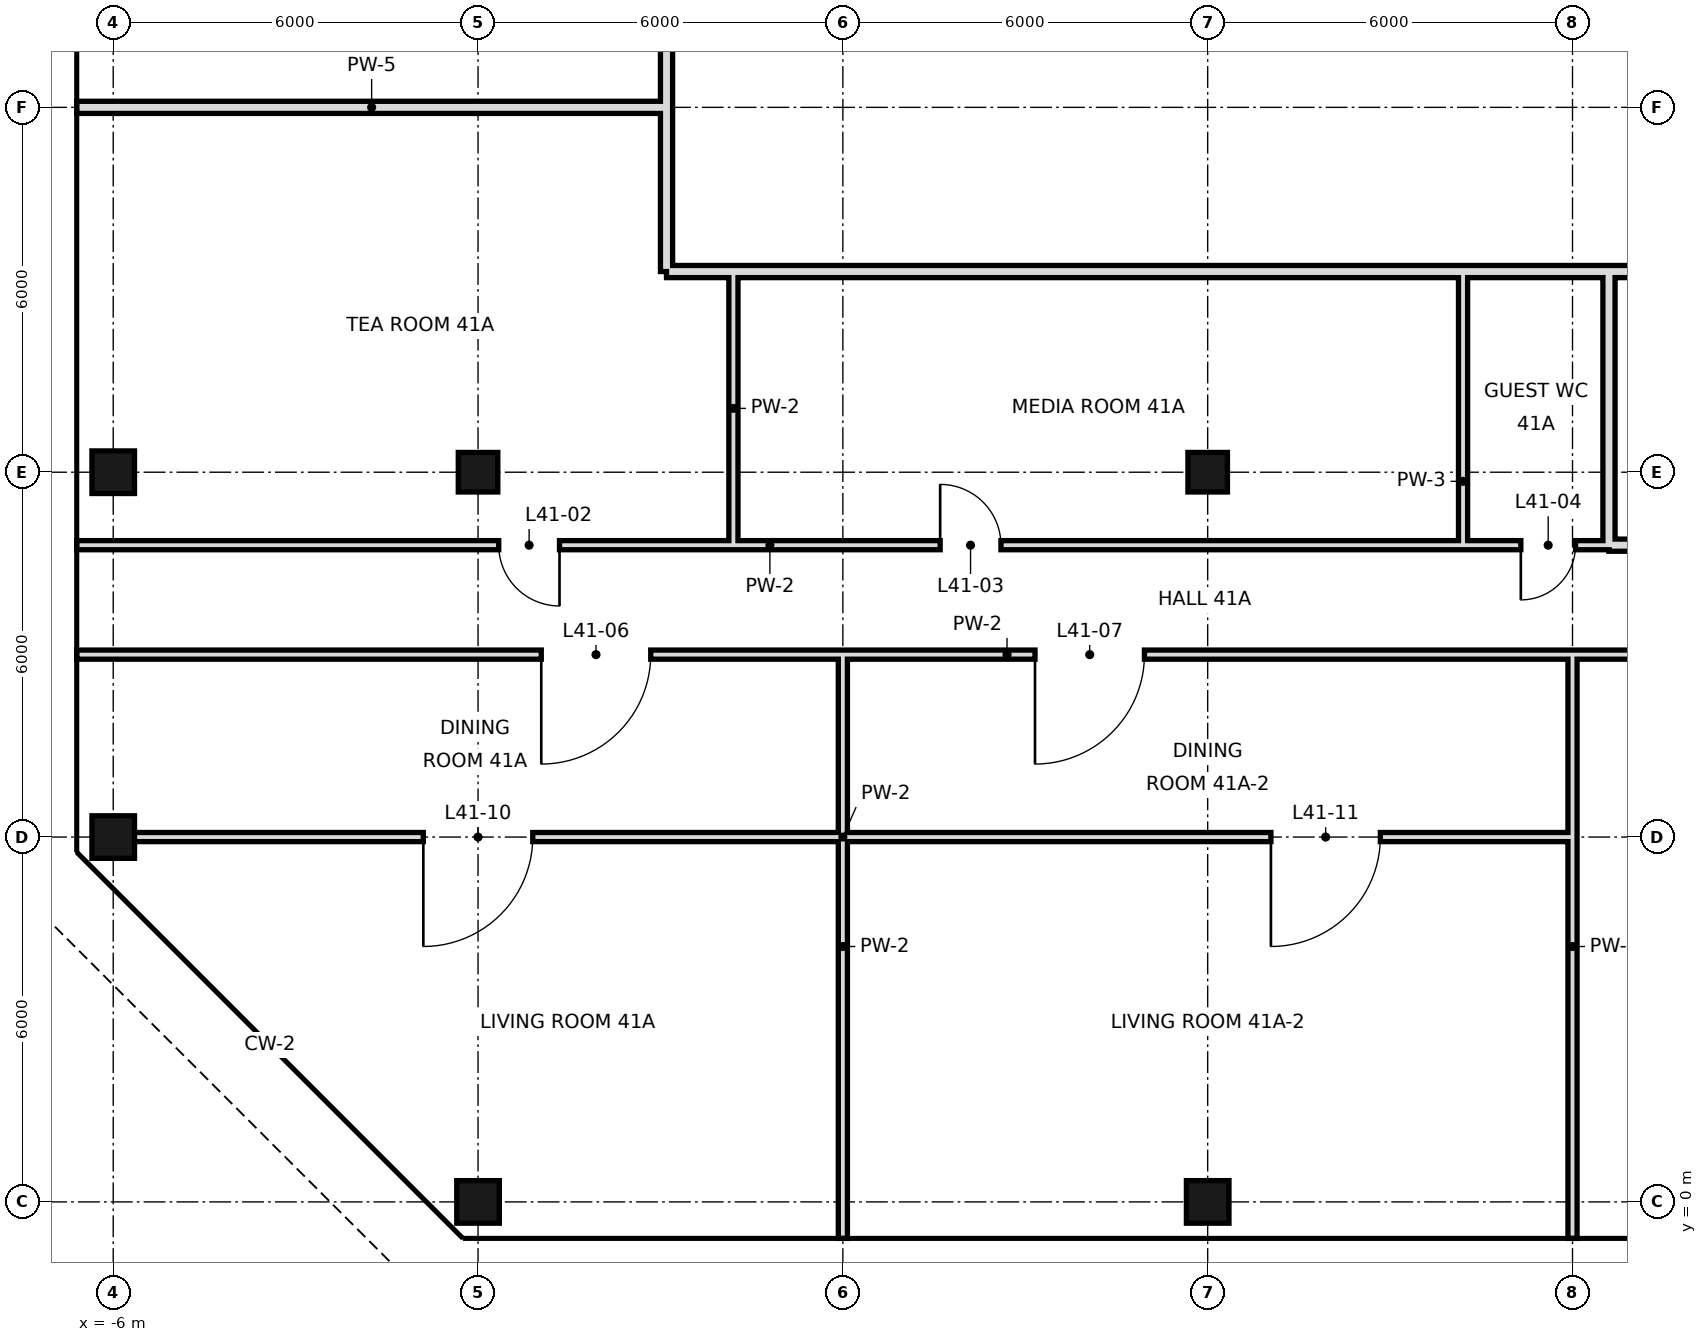
"""IFC4 building model, lengths in metres.
Left out: names, types, materials, properties, quantities, classifications, styles, units other than length and angle.
Written with IfcOpenShell. Run it as: python <this file> out.ifc"""

import sys

from ifc_helpers import new_model, si_unit, direction, frame, frame_2d, origin, origin_2d, place, context, subcontext, project, spatial, rectangle, hollow_rectangle, extrude, element, fill, save


model = new_model("IFC4")
c1 = context("Model", 3, precision=1e-05, world=origin(), true_north=direction((0.0, 1.0)))
c2 = subcontext(c1, "Body", "Model", "MODEL_VIEW")
j1 = project(units=[si_unit("LENGTHUNIT", "METRE"), si_unit("PLANEANGLEUNIT", "RADIAN")], contexts=[c1])
p1 = place(None, origin())
s1 = spatial("IfcSite", under=j1, at=p1, CompositionType="ELEMENT")
p2 = place(p1, origin())
s2 = spatial("IfcBuilding", under=s1, at=p2, CompositionType="ELEMENT")
p3 = place(p2, frame((0.0, 0.0, 178.0)))
s3 = spatial("IfcBuildingStorey", under=s2, at=p3, CompositionType="ELEMENT", Elevation=178.0)
for number, where, z_axis, x_axis in (
    (1, (-6.0, 6.0, 0.0), (0.0, 0.0, 1.0), (1.0, 0.0, 0.0)),
    (2, (-6.0, 12.0, 0.0), (0.0, 0.0, 1.0), (1.0, 0.0, 0.0)),
    (3, (0.0, 0.0, 0.0), (0.0, 0.0, 1.0), (1.0, 0.0, 0.0)),
):
    element("IfcColumn", number, at=place(p3, frame(where, z_axis=z_axis, x_axis=x_axis)), inside=s3, PredefinedType="COLUMN", context=c2, shape_type="SweptSolid", body=[
        extrude(hollow_rectangle(XDim=0.7, YDim=0.7, WallThickness=0.036, at=origin_2d()), origin(), (0.0, 0.0, 1.0), 3.6),
    ])
p4 = place(p3, frame((0.0, 12.0, 0.0), z_axis=(0.0, 0.0, 1.0), x_axis=(1.0, 0.0, 0.0)))
e4 = element("IfcColumn", 4, at=p4, inside=s3, PredefinedType="COLUMN", context=c2, shape_type="SweptSolid", body=[
    extrude(hollow_rectangle(XDim=0.65, YDim=0.65, WallThickness=0.032, at=origin_2d()), origin(), (0.0, 0.0, 1.0), 3.6),
])
p5 = place(p3, frame((12.0, 0.0, 0.0), z_axis=(0.0, 0.0, 1.0), x_axis=(1.0, 0.0, 0.0)))
e5 = element("IfcColumn", 5, at=p5, inside=s3, PredefinedType="COLUMN", context=c2, shape_type="SweptSolid", body=[
    extrude(hollow_rectangle(XDim=0.7, YDim=0.7, WallThickness=0.036, at=origin_2d()), origin(), (0.0, 0.0, 1.0), 3.6),
])
p6 = place(p3, frame((12.0, 12.0, 0.0), z_axis=(0.0, 0.0, 1.0), x_axis=(1.0, 0.0, 0.0)))
e6 = element("IfcColumn", 6, at=p6, inside=s3, PredefinedType="COLUMN", context=c2, shape_type="SweptSolid", body=[
    extrude(hollow_rectangle(XDim=0.65, YDim=0.65, WallThickness=0.032, at=origin_2d()), origin(), (0.0, 0.0, 1.0), 3.6),
])
p7 = place(p3, frame((16.2, 10.8, 0.0), z_axis=(0.0, 0.0, 1.0), x_axis=(0.0, 1.0, 0.0)))
e7 = element("IfcWall", 7, at=p7, inside=s3, PredefinedType="PARTITIONING", context=c2, shape_type="SweptSolid", body=[
    extrude(rectangle(XDim=4.5, YDim=0.15, at=frame_2d((2.25, 0.0))), origin(), (0.0, 0.0, 1.0), 3.42),
])
p8 = place(p3, frame((18.0, -0.6, 0.0), z_axis=(0.0, 0.0, 1.0), x_axis=(0.0, 1.0, 0.0)))
e8 = element("IfcWall", 8, at=p8, inside=s3, PredefinedType="PARTITIONING", context=c2, shape_type="SweptSolid", body=[
    extrude(rectangle(XDim=9.6, YDim=0.15, at=frame_2d((4.8, 0.0))), origin(), (0.0, 0.0, 1.0), 2.72),
])
p9 = place(p3, frame((18.6, 10.8, 0.0), z_axis=(0.0, 0.0, 1.0), x_axis=(0.0, 1.0, 0.0)))
e9 = element("IfcWall", 9, at=p9, inside=s3, PredefinedType="SOLIDWALL", context=c2, shape_type="SweptSolid", body=[
    extrude(rectangle(XDim=4.5, YDim=0.2, at=frame_2d((2.25, 0.0))), origin(), (0.0, 0.0, 1.0), 2.72),
])
p10 = place(p3, frame((3.1, 15.3, 0.0), z_axis=(0.0, 0.0, 1.0), x_axis=(0.0, 1.0, 0.0)))
e10 = element("IfcWall", 10, at=p10, inside=s3, PredefinedType="SOLIDWALL", context=c2, shape_type="SweptSolid", body=[
    extrude(rectangle(XDim=33.3, YDim=0.2, at=frame_2d((16.65, 0.0))), origin(), (0.0, 0.0, 1.0), 2.72),
])
p11 = place(p10, frame((17.1, 0.0, 0.0)))
e11 = element("IfcOpeningElement", 11, at=p11, cuts=e10, PredefinedType="OPENING", context=c2, shape_type="SweptSolid", body=[
    extrude(rectangle(XDim=1.2, YDim=2.4, at=frame_2d((0.6, 1.2))), frame((0.0, 0.11, 0.0), z_axis=(0.0, -1.0, 0.0), x_axis=(1.0, 0.0, 0.0)), (0.0, 0.0, 1.0), 0.22),
])
p12 = place(p3, frame((4.2, 10.8, 0.0), z_axis=(0.0, 0.0, 1.0), x_axis=(0.0, 1.0, 0.0)))
e12 = element("IfcWall", 12, at=p12, inside=s3, PredefinedType="PARTITIONING", context=c2, shape_type="SweptSolid", body=[
    extrude(rectangle(XDim=4.5, YDim=0.15, at=frame_2d((2.25, 0.0))), origin(), (0.0, 0.0, 1.0), 3.42),
])
p13 = place(p3, frame((6.0, -0.6, 0.0), z_axis=(0.0, 0.0, 1.0), x_axis=(0.0, 1.0, 0.0)))
e13 = element("IfcWall", 13, at=p13, inside=s3, PredefinedType="PARTITIONING", context=c2, shape_type="SweptSolid", body=[
    extrude(rectangle(XDim=9.6, YDim=0.15, at=frame_2d((4.8, 0.0))), origin(), (0.0, 0.0, 1.0), 2.72),
])
p14 = place(p3, frame((18.6, 10.8, 0.0), z_axis=(0.0, 0.0, 1.0), x_axis=(1.0, 0.0, 0.0)))
e14 = element("IfcWall", 14, at=p14, inside=s3, PredefinedType="SOLIDWALL", context=c2, shape_type="SweptSolid", body=[
    extrude(rectangle(XDim=5.4, YDim=0.2, at=frame_2d((2.7, 0.0))), origin(), (0.0, 0.0, 1.0), 2.72),
])
p15 = place(p14, frame((2.98, 0.0, 0.0)))
e15 = element("IfcOpeningElement", 15, at=p15, cuts=e14, PredefinedType="OPENING", context=c2, shape_type="SweptSolid", body=[
    extrude(rectangle(XDim=1.0, YDim=2.4, at=frame_2d((0.5, 1.2))), frame((0.0, 0.11, 0.0), z_axis=(0.0, -1.0, 0.0), x_axis=(1.0, 0.0, 0.0)), (0.0, 0.0, 1.0), 0.22),
])
p16 = place(p3, frame((-6.6, 10.8, 0.0), z_axis=(0.0, 0.0, 1.0), x_axis=(1.0, 0.0, 0.0)))
e16 = element("IfcWall", 16, at=p16, inside=s3, PredefinedType="PARTITIONING", context=c2, shape_type="SweptSolid", body=[
    extrude(rectangle(XDim=22.8, YDim=0.15, at=frame_2d((11.4, 0.0))), origin(), (0.0, 0.0, 1.0), 3.42),
])
p17 = place(p16, frame((6.94, 0.0, 0.0)))
e17 = element("IfcOpeningElement", 17, at=p17, cuts=e16, PredefinedType="OPENING", context=c2, shape_type="SweptSolid", body=[
    extrude(rectangle(XDim=1.0, YDim=2.4, at=frame_2d((0.5, 1.2))), frame((0.0, 0.085, 0.0), z_axis=(0.0, -1.0, 0.0), x_axis=(1.0, 0.0, 0.0)), (0.0, 0.0, 1.0), 0.17),
])
p18 = place(p16, frame((14.2, 0.0, 0.0)))
e18 = element("IfcOpeningElement", 18, at=p18, cuts=e16, PredefinedType="OPENING", context=c2, shape_type="SweptSolid", body=[
    extrude(rectangle(XDim=1.0, YDim=2.4, at=frame_2d((0.5, 1.2))), frame((0.0, 0.085, 0.0), z_axis=(0.0, -1.0, 0.0), x_axis=(1.0, 0.0, 0.0)), (0.0, 0.0, 1.0), 0.17),
])
p19 = place(p3, frame((16.2, 10.8, 0.0), z_axis=(0.0, 0.0, 1.0), x_axis=(1.0, 0.0, 0.0)))
e19 = element("IfcWall", 19, at=p19, inside=s3, PredefinedType="PARTITIONING", context=c2, shape_type="SweptSolid", body=[
    extrude(rectangle(XDim=2.4, YDim=0.15, at=frame_2d((1.2, 0.0))), origin(), (0.0, 0.0, 1.0), 3.42),
])
p20 = place(p19, frame((0.95, 0.0, 0.0)))
e20 = element("IfcOpeningElement", 20, at=p20, cuts=e19, PredefinedType="OPENING", context=c2, shape_type="SweptSolid", body=[
    extrude(rectangle(XDim=0.9, YDim=2.4, at=frame_2d((0.45, 1.2))), frame((0.0, 0.085, 0.0), z_axis=(0.0, -1.0, 0.0), x_axis=(1.0, 0.0, 0.0)), (0.0, 0.0, 1.0), 0.17),
])
p21 = place(p3, frame((3.1, 15.3, 0.0), z_axis=(0.0, 0.0, 1.0), x_axis=(1.0, 0.0, 0.0)))
e21 = element("IfcWall", 21, at=p21, inside=s3, PredefinedType="SOLIDWALL", context=c2, shape_type="SweptSolid", body=[
    extrude(rectangle(XDim=15.5, YDim=0.2, at=frame_2d((7.75, 0.0))), origin(), (0.0, 0.0, 1.0), 2.72),
])
p22 = place(p3, frame((18.6, 15.3, 0.0), z_axis=(0.0, 0.0, 1.0), x_axis=(1.0, 0.0, 0.0)))
e22 = element("IfcWall", 22, at=p22, inside=s3, PredefinedType="SOLIDWALL", context=c2, shape_type="SweptSolid", body=[
    extrude(rectangle(XDim=5.4, YDim=0.2, at=frame_2d((2.7, 0.0))), origin(), (0.0, 0.0, 1.0), 3.42),
])
p23 = place(p3, frame((-6.6, 18.0, 0.0), z_axis=(0.0, 0.0, 1.0), x_axis=(1.0, 0.0, 0.0)))
e23 = element("IfcWall", 23, at=p23, inside=s3, PredefinedType="SOLIDWALL", context=c2, shape_type="SweptSolid", body=[
    extrude(rectangle(XDim=9.7, YDim=0.2, at=frame_2d((4.85, 0.0))), origin(), (0.0, 0.0, 1.0), 2.72),
])
p24 = place(p3, frame((-6.0, 6.0, 0.0), z_axis=(0.0, 0.0, 1.0), x_axis=(1.0, 0.0, 0.0)))
e24 = element("IfcWall", 24, at=p24, inside=s3, PredefinedType="PARTITIONING", context=c2, shape_type="SweptSolid", body=[
    extrude(rectangle(XDim=24.0, YDim=0.15, at=frame_2d((12.0, 0.0))), origin(), (0.0, 0.0, 1.0), 2.97),
])
p25 = place(p24, frame((5.1, 0.0, 0.0)))
e25 = element("IfcOpeningElement", 25, at=p25, cuts=e24, PredefinedType="OPENING", context=c2, shape_type="SweptSolid", body=[
    extrude(rectangle(XDim=1.8, YDim=2.4, at=frame_2d((0.9, 1.2))), frame((0.0, 0.085, 0.0), z_axis=(0.0, -1.0, 0.0), x_axis=(1.0, 0.0, 0.0)), (0.0, 0.0, 1.0), 0.17),
])
p26 = place(p24, frame((19.04, 0.0, 0.0)))
e26 = element("IfcOpeningElement", 26, at=p26, cuts=e24, PredefinedType="OPENING", context=c2, shape_type="SweptSolid", body=[
    extrude(rectangle(XDim=1.8, YDim=2.4, at=frame_2d((0.9, 1.2))), frame((0.0, 0.085, 0.0), z_axis=(0.0, -1.0, 0.0), x_axis=(1.0, 0.0, 0.0)), (0.0, 0.0, 1.0), 0.17),
])
p27 = place(p3, frame((-6.6, 9.0, 0.0), z_axis=(0.0, 0.0, 1.0), x_axis=(1.0, 0.0, 0.0)))
e27 = element("IfcWall", 27, at=p27, inside=s3, PredefinedType="PARTITIONING", context=c2, shape_type="SweptSolid", body=[
    extrude(rectangle(XDim=30.6, YDim=0.15, at=frame_2d((15.3, 0.0))), origin(), (0.0, 0.0, 1.0), 3.42),
])
p28 = place(p27, frame((7.64, 0.0, 0.0)))
e28 = element("IfcOpeningElement", 28, at=p28, cuts=e27, PredefinedType="OPENING", context=c2, shape_type="SweptSolid", body=[
    extrude(rectangle(XDim=1.8, YDim=2.4, at=frame_2d((0.9, 1.2))), frame((0.0, 0.085, 0.0), z_axis=(0.0, -1.0, 0.0), x_axis=(1.0, 0.0, 0.0)), (0.0, 0.0, 1.0), 0.17),
])
p29 = place(p27, frame((15.76, 0.0, 0.0)))
e29 = element("IfcOpeningElement", 29, at=p29, cuts=e27, PredefinedType="OPENING", context=c2, shape_type="SweptSolid", body=[
    extrude(rectangle(XDim=1.8, YDim=2.4, at=frame_2d((0.9, 1.2))), frame((0.0, 0.085, 0.0), z_axis=(0.0, -1.0, 0.0), x_axis=(1.0, 0.0, 0.0)), (0.0, 0.0, 1.0), 0.17),
])
p30 = place(p27, frame((27.44, 0.0, 0.0)))
e30 = element("IfcOpeningElement", 30, at=p30, cuts=e27, PredefinedType="OPENING", context=c2, shape_type="SweptSolid", body=[
    extrude(rectangle(XDim=1.8, YDim=2.4, at=frame_2d((0.9, 1.2))), frame((0.0, 0.085, 0.0), z_axis=(0.0, -1.0, 0.0), x_axis=(1.0, 0.0, 0.0)), (0.0, 0.0, 1.0), 0.17),
])
p31 = place(p17, origin())
e31 = element("IfcDoor", 31, at=p31, inside=s3, OperationType="SINGLE_SWING_RIGHT", PredefinedType="DOOR", context=c2, shape_type="SweptSolid", body=[
    extrude(rectangle(XDim=1.0, YDim=2.4, at=frame_2d((0.5, 1.2))), frame((0.0, 0.025, 0.0), z_axis=(0.0, -1.0, 0.0), x_axis=(1.0, 0.0, 0.0)), (0.0, 0.0, 1.0), 0.05),
])
fill(e17, e31)
p32 = place(p18, origin())
e32 = element("IfcDoor", 32, at=p32, inside=s3, OperationType="SINGLE_SWING_LEFT", PredefinedType="DOOR", context=c2, shape_type="SweptSolid", body=[
    extrude(rectangle(XDim=1.0, YDim=2.4, at=frame_2d((0.5, 1.2))), frame((0.0, 0.025, 0.0), z_axis=(0.0, -1.0, 0.0), x_axis=(1.0, 0.0, 0.0)), (0.0, 0.0, 1.0), 0.05),
])
fill(e18, e32)
p33 = place(p20, frame((0.9, 0.0, 0.0), z_axis=(0.0, 0.0, 1.0), x_axis=(-1.0, 0.0, 0.0)))
e33 = element("IfcDoor", 33, at=p33, inside=s3, OperationType="SINGLE_SWING_RIGHT", PredefinedType="DOOR", context=c2, shape_type="SweptSolid", body=[
    extrude(rectangle(XDim=0.9, YDim=2.4, at=frame_2d((0.45, 1.2))), frame((0.0, 0.025, 0.0), z_axis=(0.0, -1.0, 0.0), x_axis=(1.0, 0.0, 0.0)), (0.0, 0.0, 1.0), 0.05),
])
fill(e20, e33)
p34 = place(p28, frame((1.8, 0.0, 0.0), z_axis=(0.0, 0.0, 1.0), x_axis=(-1.0, 0.0, 0.0)))
e34 = element("IfcDoor", 34, at=p34, inside=s3, OperationType="SINGLE_SWING_RIGHT", PredefinedType="DOOR", context=c2, shape_type="SweptSolid", body=[
    extrude(rectangle(XDim=1.8, YDim=2.4, at=frame_2d((0.9, 1.2))), frame((0.0, 0.025, 0.0), z_axis=(0.0, -1.0, 0.0), x_axis=(1.0, 0.0, 0.0)), (0.0, 0.0, 1.0), 0.05),
])
fill(e28, e34)
p35 = place(p29, frame((1.8, 0.0, 0.0), z_axis=(0.0, 0.0, 1.0), x_axis=(-1.0, 0.0, 0.0)))
e35 = element("IfcDoor", 35, at=p35, inside=s3, OperationType="SINGLE_SWING_RIGHT", PredefinedType="DOOR", context=c2, shape_type="SweptSolid", body=[
    extrude(rectangle(XDim=1.8, YDim=2.4, at=frame_2d((0.9, 1.2))), frame((0.0, 0.025, 0.0), z_axis=(0.0, -1.0, 0.0), x_axis=(1.0, 0.0, 0.0)), (0.0, 0.0, 1.0), 0.05),
])
fill(e29, e35)
p36 = place(p25, frame((1.8, 0.0, 0.0), z_axis=(0.0, 0.0, 1.0), x_axis=(-1.0, 0.0, 0.0)))
e36 = element("IfcDoor", 36, at=p36, inside=s3, OperationType="SINGLE_SWING_RIGHT", PredefinedType="DOOR", context=c2, shape_type="SweptSolid", body=[
    extrude(rectangle(XDim=1.8, YDim=2.4, at=frame_2d((0.9, 1.2))), frame((0.0, 0.025, 0.0), z_axis=(0.0, -1.0, 0.0), x_axis=(1.0, 0.0, 0.0)), (0.0, 0.0, 1.0), 0.05),
])
fill(e25, e36)
p37 = place(p26, frame((1.8, 0.0, 0.0), z_axis=(0.0, 0.0, 1.0), x_axis=(-1.0, 0.0, 0.0)))
e37 = element("IfcDoor", 37, at=p37, inside=s3, OperationType="SINGLE_SWING_RIGHT", PredefinedType="DOOR", context=c2, shape_type="SweptSolid", body=[
    extrude(rectangle(XDim=1.8, YDim=2.4, at=frame_2d((0.9, 1.2))), frame((0.0, 0.025, 0.0), z_axis=(0.0, -1.0, 0.0), x_axis=(1.0, 0.0, 0.0)), (0.0, 0.0, 1.0), 0.05),
])
fill(e26, e37)
save(model, sys.argv[1])
